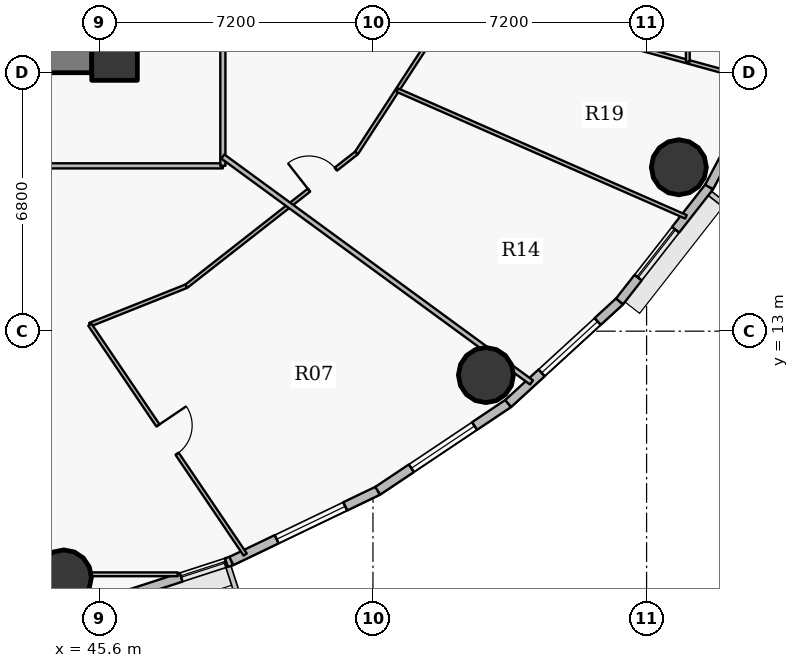
"""IFC4 building model, lengths in metres.
Left out: names, types, materials, properties, quantities, classifications, styles, units other than length and angle.
Written with IfcOpenShell. Run it as: python <this file> out.ifc"""

import sys

from ifc_helpers import new_model, si_unit, direction, frame, frame_2d, origin, origin_2d, place, context, subcontext, project, spatial, rectangle, hollow_circle, extrude, source, transform, mapped, element, fill, save


model = new_model("IFC4")
c1 = context("Model", 3, precision=1e-05, world=origin(), true_north=direction((0.0, 1.0)))
c2 = subcontext(c1, "Body", "Model", "MODEL_VIEW")
j1 = project(units=[si_unit("LENGTHUNIT", "METRE"), si_unit("PLANEANGLEUNIT", "RADIAN")], contexts=[c1])
p1 = place(None, origin())
s1 = spatial("IfcSite", under=j1, at=p1, CompositionType="ELEMENT")
p2 = place(p1, origin())
s2 = spatial("IfcBuilding", under=s1, at=p2, CompositionType="ELEMENT")
p3 = place(p2, frame((0.0, 0.0, 142.2)))
s3 = spatial("IfcBuildingStorey", under=s2, at=p3, CompositionType="ELEMENT", Elevation=142.2)
p4 = place(p3, frame((46.0, 20.2, 0.0), z_axis=(0.0, 0.0, 1.0), x_axis=(1.0, 0.0, 0.0)))
e1 = element("IfcColumn", 1, at=p4, inside=s3, PredefinedType="COLUMN", context=c2, shape_type="SweptSolid", body=[
    extrude(rectangle(XDim=1.2, YDim=1.2, at=origin_2d()), origin(), (0.0, 0.0, 1.0), 3.75),
])
p5 = place(p3, frame((45.4, 20.2, 0.0), z_axis=(0.0, 0.0, 1.0), x_axis=(-1.0, 0.0, 0.0)))
e2 = element("IfcWall", 2, at=p5, inside=s3, PredefinedType="SHEAR", context=c2, shape_type="SweptSolid", body=[
    extrude(rectangle(XDim=18.8, YDim=0.8, at=frame_2d((9.4, 0.0))), origin(), (0.0, 0.0, 1.0), 2.9),
])
p6 = place(p5, frame((10.15, 0.0, 0.0)))
e3 = element("IfcOpeningElement", 3, at=p6, cuts=e2, PredefinedType="OPENING", context=c2, shape_type="SweptSolid", body=[
    extrude(rectangle(XDim=1.15, YDim=2.15, at=origin_2d()), frame((0.575, 0.41, 1.075), z_axis=(0.0, -1.0, 0.0), x_axis=(1.0, 0.0, 0.0)), (0.0, 0.0, 1.0), 0.82),
])
for number, where, z_axis, x_axis in (
    (4, (44.666, 6.519, 0.0), (0.0, 0.0, 1.0), (1.0, 0.0, 0.0)),
    (5, (55.773, 11.844, 0.0), (0.0, 0.0, 1.0), (1.0, 0.0, 0.0)),
    (6, (60.849, 17.312, 0.0), (0.0, 0.0, 1.0), (1.0, 0.0, 0.0)),
):
    element("IfcColumn", number, at=place(p3, frame(where, z_axis=z_axis, x_axis=x_axis)), inside=s3, PredefinedType="COLUMN", context=c2, shape_type="SweptSolid", body=[
        extrude(hollow_circle(Radius=0.725, WallThickness=0.042, at=origin_2d()), origin(), (0.0, 0.0, 1.0), 3.75),
    ])
p7 = place(p3, frame((49.074, 6.953, 0.0), z_axis=(0.0, 0.0, 1.0), x_axis=(-0.951211346073, -0.308540070495, 0.0)))
e7 = element("IfcWall", 7, at=p7, inside=s3, PredefinedType="SOLIDWALL", context=c2, shape_type="SweptSolid", body=[
    extrude(rectangle(XDim=4.388, YDim=0.24, at=frame_2d((2.194, 0.0))), origin(), (0.0, 0.0, 1.0), 3.45),
])
p8 = place(p7, frame((0.14, 0.0, 0.9)))
e8 = element("IfcOpeningElement", 8, at=p8, cuts=e7, PredefinedType="OPENING", context=c2, shape_type="SweptSolid", body=[
    extrude(rectangle(XDim=1.25, YDim=1.65, at=origin_2d()), frame((0.625, 0.13, 0.825), z_axis=(0.0, -1.0, 0.0), x_axis=(1.0, 0.0, 0.0)), (0.0, 0.0, 1.0), 0.26),
])
p9 = place(p3, frame((52.925, 8.801, 0.0), z_axis=(0.0, 0.0, 1.0), x_axis=(-0.901589935876, -0.432591709962, 0.0)))
e9 = element("IfcWall", 9, at=p9, inside=s3, PredefinedType="SOLIDWALL", context=c2, shape_type="SweptSolid", body=[
    extrude(rectangle(XDim=4.272, YDim=0.24, at=frame_2d((2.136, 0.0))), origin(), (0.0, 0.0, 1.0), 3.45),
])
p10 = place(p9, frame((0.949, 0.0, 0.9)))
e10 = element("IfcOpeningElement", 10, at=p10, cuts=e9, PredefinedType="OPENING", context=c2, shape_type="SweptSolid", body=[
    extrude(rectangle(XDim=2.0, YDim=1.75, at=origin_2d()), frame((1.0, 0.13, 0.875), z_axis=(0.0, -1.0, 0.0), x_axis=(1.0, 0.0, 0.0)), (0.0, 0.0, 1.0), 0.26),
])
p11 = place(p3, frame((56.358, 11.097, 0.0), z_axis=(0.0, 0.0, 1.0), x_axis=(-0.831221811447, -0.555940914284, 0.0)))
e11 = element("IfcWall", 11, at=p11, inside=s3, PredefinedType="SOLIDWALL", context=c2, shape_type="SweptSolid", body=[
    extrude(rectangle(XDim=4.13, YDim=0.24, at=frame_2d((2.065, 0.0))), origin(), (0.0, 0.0, 1.0), 3.45),
])
p12 = place(p11, frame((1.065, 0.0, 0.9)))
e12 = element("IfcOpeningElement", 12, at=p12, cuts=e11, PredefinedType="OPENING", context=c2, shape_type="SweptSolid", body=[
    extrude(rectangle(XDim=2.0, YDim=1.75, at=origin_2d()), frame((1.0, 0.13, 0.875), z_axis=(0.0, -1.0, 0.0), x_axis=(1.0, 0.0, 0.0)), (0.0, 0.0, 1.0), 0.26),
])
p13 = place(p3, frame((59.289, 13.783, 0.0), z_axis=(0.0, 0.0, 1.0), x_axis=(-0.737113356241, -0.675769117414, 0.0)))
e13 = element("IfcWall", 13, at=p13, inside=s3, PredefinedType="SOLIDWALL", context=c2, shape_type="SweptSolid", body=[
    extrude(rectangle(XDim=3.976, YDim=0.24, at=frame_2d((1.988, 0.0))), origin(), (0.0, 0.0, 1.0), 3.45),
])
p14 = place(p13, frame((0.783, 0.0, 0.9)))
e14 = element("IfcOpeningElement", 14, at=p14, cuts=e13, PredefinedType="OPENING", context=c2, shape_type="SweptSolid", body=[
    extrude(rectangle(XDim=2.0, YDim=1.75, at=origin_2d()), frame((1.0, 0.13, 0.875), z_axis=(0.0, -1.0, 0.0), x_axis=(1.0, 0.0, 0.0)), (0.0, 0.0, 1.0), 0.26),
])
p15 = place(p3, frame((61.645, 16.794, 0.0), z_axis=(0.0, 0.0, 1.0), x_axis=(-0.616272103517, -0.787533297345, 0.0)))
e15 = element("IfcWall", 15, at=p15, inside=s3, PredefinedType="SOLIDWALL", context=c2, shape_type="SweptSolid", body=[
    extrude(rectangle(XDim=3.823, YDim=0.24, at=frame_2d((1.912, 0.0))), origin(), (0.0, 0.0, 1.0), 3.45),
])
p16 = place(p15, frame((1.43, 0.0, 0.9)))
e16 = element("IfcOpeningElement", 16, at=p16, cuts=e15, PredefinedType="OPENING", context=c2, shape_type="SweptSolid", body=[
    extrude(rectangle(XDim=1.6, YDim=1.75, at=origin_2d()), frame((0.8, 0.13, 0.875), z_axis=(0.0, -1.0, 0.0), x_axis=(1.0, 0.0, 0.0)), (0.0, 0.0, 1.0), 0.26),
])
p17 = place(p3, frame((63.37, 20.055, 0.0), z_axis=(0.0, 0.0, 1.0), x_axis=(-0.467614004126, -0.883932770716, 0.0)))
e17 = element("IfcWall", 17, at=p17, inside=s3, PredefinedType="SOLIDWALL", context=c2, shape_type="SweptSolid", body=[
    extrude(rectangle(XDim=3.689, YDim=0.24, at=frame_2d((1.844, 0.0))), origin(), (0.0, 0.0, 1.0), 3.45),
])
p18 = place(p3, frame((38.477, 17.35, 0.0), z_axis=(0.0, 0.0, 1.0), x_axis=(1.0, 0.0, 0.0)))
e18 = element("IfcWall", 18, at=p18, inside=s3, PredefinedType="PARTITIONING", context=c2, shape_type="SweptSolid", body=[
    extrude(rectangle(XDim=10.373, YDim=0.135, at=frame_2d((5.187, 0.0))), origin(), (0.0, 0.0, 1.0), 2.885),
])
p19 = place(p18, frame((4.687, 0.0, 0.0)))
e19 = element("IfcOpeningElement", 19, at=p19, cuts=e18, PredefinedType="OPENING", context=c2, shape_type="SweptSolid", body=[
    extrude(rectangle(XDim=1.0, YDim=2.15, at=origin_2d()), frame((0.5, 0.078, 1.075), z_axis=(0.0, -1.0, 0.0), x_axis=(1.0, 0.0, 0.0)), (0.0, 0.0, 1.0), 0.155),
])
p20 = place(p3, frame((41.208, 6.603, 0.0), z_axis=(0.0, 0.0, 1.0), x_axis=(1.0, 0.0, 0.0)))
e20 = element("IfcWall", 20, at=p20, inside=s3, PredefinedType="PARTITIONING", context=c2, shape_type="SweptSolid", body=[
    extrude(rectangle(XDim=6.453, YDim=0.1, at=frame_2d((3.227, 0.0))), origin(), (0.0, 0.0, 1.0), 2.885),
])
p21 = place(p20, frame((1.183, 0.0, 0.0)))
e21 = element("IfcOpeningElement", 21, at=p21, cuts=e20, PredefinedType="OPENING", context=c2, shape_type="SweptSolid", body=[
    extrude(rectangle(XDim=0.9, YDim=2.1, at=origin_2d()), frame((0.45, 0.06, 1.05), z_axis=(0.0, -1.0, 0.0), x_axis=(1.0, 0.0, 0.0)), (0.0, 0.0, 1.0), 0.12),
])
p22 = place(p3, frame((45.35, 13.17, 0.0), z_axis=(0.0, 0.0, 1.0), x_axis=(0.928802486491, 0.370575149044, 0.0)))
e22 = element("IfcWall", 22, at=p22, inside=s3, PredefinedType="PARTITIONING", context=c2, shape_type="SweptSolid", body=[
    extrude(rectangle(XDim=2.736, YDim=0.1, at=frame_2d((1.368, 0.0))), origin(), (0.0, 0.0, 1.0), 3.45),
])
p23 = place(p3, frame((45.35, 13.17, 0.0), z_axis=(0.0, 0.0, 1.0), x_axis=(0.560082631059, -0.828436748573, 0.0)))
e23 = element("IfcWall", 23, at=p23, inside=s3, PredefinedType="PARTITIONING", context=c2, shape_type="SweptSolid", body=[
    extrude(rectangle(XDim=7.301, YDim=0.1, at=frame_2d((3.65, 0.0))), origin(), (0.0, 0.0, 1.0), 2.885),
])
p24 = place(p23, frame((3.2, 0.0, 0.0)))
e24 = element("IfcOpeningElement", 24, at=p24, cuts=e23, PredefinedType="OPENING", context=c2, shape_type="SweptSolid", body=[
    extrude(rectangle(XDim=0.9, YDim=2.1, at=origin_2d()), frame((0.45, 0.06, 1.05), z_axis=(0.0, -1.0, 0.0), x_axis=(1.0, 0.0, 0.0)), (0.0, 0.0, 1.0), 0.12),
])
p25 = place(p3, frame((47.891, 14.184, 0.0), z_axis=(0.0, 0.0, 1.0), x_axis=(0.787333679705, 0.616527109544, 0.0)))
e25 = element("IfcWall", 25, at=p25, inside=s3, PredefinedType="PARTITIONING", context=c2, shape_type="SweptSolid", body=[
    extrude(rectangle(XDim=5.685, YDim=0.1, at=frame_2d((2.842, 0.0))), origin(), (0.0, 0.0, 1.0), 2.885),
])
p26 = place(p25, frame((4.096, 0.0, 0.0)))
e26 = element("IfcOpeningElement", 26, at=p26, cuts=e25, PredefinedType="OPENING", context=c2, shape_type="SweptSolid", body=[
    extrude(rectangle(XDim=0.9, YDim=2.1, at=origin_2d()), frame((0.45, 0.06, 1.05), z_axis=(0.0, -1.0, 0.0), x_axis=(1.0, 0.0, 0.0)), (0.0, 0.0, 1.0), 0.12),
])
p27 = place(p3, frame((48.85, 17.35, 0.0), z_axis=(0.0, 0.0, 1.0), x_axis=(0.0, 1.0, 0.0)))
e27 = element("IfcWall", 27, at=p27, inside=s3, PredefinedType="PARTITIONING", context=c2, shape_type="SweptSolid", body=[
    extrude(rectangle(XDim=19.3, YDim=0.135, at=frame_2d((9.65, 0.0))), origin(), (0.0, 0.0, 1.0), 2.885),
])
p28 = place(p27, frame((7.609, 0.0, 0.0)))
e28 = element("IfcOpeningElement", 28, at=p28, cuts=e27, PredefinedType="OPENING", context=c2, shape_type="SweptSolid", body=[
    extrude(rectangle(XDim=1.0, YDim=2.15, at=origin_2d()), frame((0.5, 0.078, 1.075), z_axis=(0.0, -1.0, 0.0), x_axis=(1.0, 0.0, 0.0)), (0.0, 0.0, 1.0), 0.155),
])
p29 = place(p3, frame((48.85, 17.595, 0.0), z_axis=(0.0, 0.0, 1.0), x_axis=(0.806958414, -0.590608261096, 0.0)))
e29 = element("IfcWall", 29, at=p29, inside=s3, PredefinedType="PARTITIONING", context=c2, shape_type="SweptSolid", body=[
    extrude(rectangle(XDim=10.063, YDim=0.135, at=frame_2d((5.032, 0.0))), origin(), (0.0, 0.0, 1.0), 2.885),
])
p30 = place(p3, frame((52.366, 17.689, 0.0), z_axis=(0.0, 0.0, 1.0), x_axis=(0.545413870093, 0.838166874978, 0.0)))
e30 = element("IfcWall", 30, at=p30, inside=s3, PredefinedType="PARTITIONING", context=c2, shape_type="SweptSolid", body=[
    extrude(rectangle(XDim=4.859, YDim=0.1, at=frame_2d((2.43, 0.0))), origin(), (0.0, 0.0, 1.0), 2.885),
])
p31 = place(p3, frame((53.442, 19.342, 0.0), z_axis=(0.0, 0.0, 1.0), x_axis=(0.91563160904, -0.402018353469, 0.0)))
e31 = element("IfcWall", 31, at=p31, inside=s3, PredefinedType="PARTITIONING", context=c2, shape_type="SweptSolid", body=[
    extrude(rectangle(XDim=8.294, YDim=0.1, at=frame_2d((4.147, 0.0))), origin(), (0.0, 0.0, 1.0), 2.885),
])
p32 = place(p3, frame((55.017, 21.762, 0.0), z_axis=(0.0, 0.0, 1.0), x_axis=(0.964092156587, -0.265567907714, 0.0)))
e32 = element("IfcWall", 32, at=p32, inside=s3, PredefinedType="PARTITIONING", context=c2, shape_type="SweptSolid", body=[
    extrude(rectangle(XDim=8.385, YDim=0.1, at=frame_2d((4.192, 0.0))), origin(), (0.0, 0.0, 1.0), 2.885),
])
p33 = place(p32, frame((2.717, 0.0, 0.0)))
e33 = element("IfcOpeningElement", 33, at=p33, cuts=e32, PredefinedType="OPENING", context=c2, shape_type="SweptSolid", body=[
    extrude(rectangle(XDim=0.9, YDim=2.1, at=origin_2d()), frame((0.45, 0.06, 1.05), z_axis=(0.0, -1.0, 0.0), x_axis=(1.0, 0.0, 0.0)), (0.0, 0.0, 1.0), 0.12),
])
p34 = place(p3, frame((61.085, 20.09, 0.0), z_axis=(0.0, 0.0, 1.0), x_axis=(0.0, 1.0, 0.0)))
e34 = element("IfcWall", 34, at=p34, inside=s3, PredefinedType="PARTITIONING", context=c2, shape_type="SweptSolid", body=[
    extrude(rectangle(XDim=9.281, YDim=0.1, at=frame_2d((4.641, 0.0))), origin(), (0.0, 0.0, 1.0), 2.885),
])
p35 = place(p34, frame((4.19, 0.0, 0.0)))
e35 = element("IfcOpeningElement", 35, at=p35, cuts=e34, PredefinedType="OPENING", context=c2, shape_type="SweptSolid", body=[
    extrude(rectangle(XDim=0.9, YDim=2.1, at=origin_2d()), frame((0.45, 0.06, 1.05), z_axis=(0.0, -1.0, 0.0), x_axis=(1.0, 0.0, 0.0)), (0.0, 0.0, 1.0), 0.12),
])
p36 = place(p3, frame((45.41, 19.8, 0.0), z_axis=(0.0, 0.0, 1.0), x_axis=(1.0, 0.0, 0.0)))
e36 = element("IfcWall", 36, at=p36, inside=s3, PredefinedType="PARTITIONING", context=c2, shape_type="SweptSolid", body=[
    extrude(rectangle(XDim=0.99, YDim=0.135, at=frame_2d((0.495, 0.0))), origin(), (0.0, 0.0, 1.0), 2.885),
])
p37 = place(p3, frame((46.4, 20.107, 0.0), z_axis=(0.0, 0.0, 1.0), x_axis=(0.0, 1.0, 0.0)))
e37 = element("IfcWall", 37, at=p37, inside=s3, PredefinedType="PARTITIONING", context=c2, shape_type="SweptSolid", body=[
    extrude(rectangle(XDim=0.683, YDim=0.135, at=frame_2d((0.341, 0.0))), origin(), (0.0, 0.0, 1.0), 3.45),
])
m1 = source(origin(), c2, "Body", "SweptSolid", [
    extrude(rectangle(XDim=2.0, YDim=1.75, at=origin_2d()), frame((1.0, 0.03, 0.875), z_axis=(0.0, -1.0, 0.0), x_axis=(1.0, 0.0, 0.0)), (0.0, 0.0, 1.0), 0.06),
])
p38 = place(p10, origin())
e38 = element("IfcWindow", 38, at=p38, inside=s3, PartitioningType="DOUBLE_PANEL_VERTICAL", PredefinedType="WINDOW", context=c2, shape_type="MappedRepresentation", body=[
    mapped(m1, transform((0.0, 0.0, 0.0), x_axis=(1.0, 0.0, 0.0), y_axis=(0.0, 1.0, 0.0), z_axis=(0.0, 0.0, 1.0), scale=1.0)),
])
fill(e10, e38)
p39 = place(p12, origin())
e39 = element("IfcWindow", 39, at=p39, inside=s3, PartitioningType="DOUBLE_PANEL_VERTICAL", PredefinedType="WINDOW", context=c2, shape_type="MappedRepresentation", body=[
    mapped(m1, transform((0.0, 0.0, 0.0), x_axis=(1.0, 0.0, 0.0), y_axis=(0.0, 1.0, 0.0), z_axis=(0.0, 0.0, 1.0), scale=1.0)),
])
fill(e12, e39)
p40 = place(p14, origin())
e40 = element("IfcWindow", 40, at=p40, inside=s3, PartitioningType="DOUBLE_PANEL_VERTICAL", PredefinedType="WINDOW", context=c2, shape_type="MappedRepresentation", body=[
    mapped(m1, transform((0.0, 0.0, 0.0), x_axis=(1.0, 0.0, 0.0), y_axis=(0.0, 1.0, 0.0), z_axis=(0.0, 0.0, 1.0), scale=1.0)),
])
fill(e14, e40)
m2 = source(origin(), c2, "Body", "SweptSolid", [
    extrude(rectangle(XDim=1.6, YDim=1.75, at=origin_2d()), frame((0.8, 0.03, 0.875), z_axis=(0.0, -1.0, 0.0), x_axis=(1.0, 0.0, 0.0)), (0.0, 0.0, 1.0), 0.06),
])
p41 = place(p16, origin())
e41 = element("IfcWindow", 41, at=p41, inside=s3, PartitioningType="DOUBLE_PANEL_VERTICAL", PredefinedType="WINDOW", context=c2, shape_type="MappedRepresentation", body=[
    mapped(m2, transform((0.0, 0.0, 0.0), x_axis=(1.0, 0.0, 0.0), y_axis=(0.0, 1.0, 0.0), z_axis=(0.0, 0.0, 1.0), scale=1.0)),
])
fill(e16, e41)
m3 = source(origin(), c2, "Body", "SweptSolid", [
    extrude(rectangle(XDim=1.25, YDim=1.65, at=origin_2d()), frame((0.625, 0.03, 0.825), z_axis=(0.0, -1.0, 0.0), x_axis=(1.0, 0.0, 0.0)), (0.0, 0.0, 1.0), 0.06),
])
p42 = place(p8, origin())
e42 = element("IfcWindow", 42, at=p42, inside=s3, PartitioningType="SINGLE_PANEL", PredefinedType="WINDOW", context=c2, shape_type="MappedRepresentation", body=[
    mapped(m3, transform((0.0, 0.0, 0.0), x_axis=(1.0, 0.0, 0.0), y_axis=(0.0, 1.0, 0.0), z_axis=(0.0, 0.0, 1.0), scale=1.0)),
])
fill(e8, e42)
m4 = source(origin(), c2, "Body", "SweptSolid", [
    extrude(rectangle(XDim=0.9, YDim=2.1, at=origin_2d()), frame((0.45, 0.025, 1.05), z_axis=(0.0, -1.0, 0.0), x_axis=(1.0, 0.0, 0.0)), (0.0, 0.0, 1.0), 0.05),
])
p43 = place(p24, origin())
e43 = element("IfcDoor", 43, at=p43, inside=s3, OperationType="SINGLE_SWING_LEFT", PredefinedType="DOOR", context=c2, shape_type="MappedRepresentation", body=[
    mapped(m4, transform((0.0, 0.0, 0.0), x_axis=(1.0, 0.0, 0.0), y_axis=(0.0, 1.0, 0.0), z_axis=(0.0, 0.0, 1.0), scale=1.0)),
])
fill(e24, e43)
p44 = place(p26, origin())
e44 = element("IfcDoor", 44, at=p44, inside=s3, OperationType="SINGLE_SWING_LEFT", PredefinedType="DOOR", context=c2, shape_type="MappedRepresentation", body=[
    mapped(m4, transform((0.0, 0.0, 0.0), x_axis=(1.0, 0.0, 0.0), y_axis=(0.0, 1.0, 0.0), z_axis=(0.0, 0.0, 1.0), scale=1.0)),
])
fill(e26, e44)
save(model, sys.argv[1])
